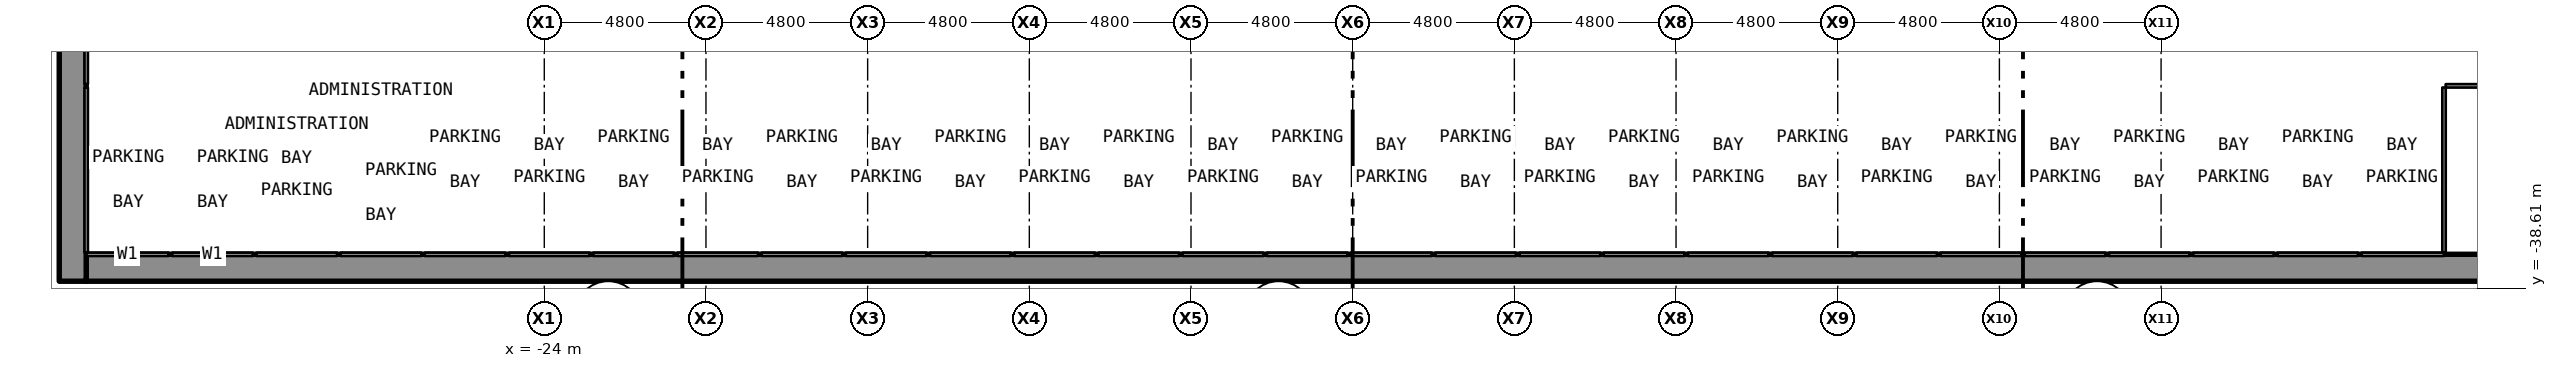
"""IFC4 building model, lengths in metres.
Left out: names, types, materials, properties, quantities, classifications, styles, units other than length and angle.
Written with IfcOpenShell. Run it as: python <this file> out.ifc"""

import sys

from ifc_helpers import new_model, si_unit, direction, frame, frame_2d, origin, place, context, subcontext, project, spatial, rectangle, extrude, element, save


model = new_model("IFC4")
c1 = context("Model", 3, precision=1e-05, world=origin(), true_north=direction((0.0, 1.0)))
c2 = subcontext(c1, "Body", "Model", "MODEL_VIEW")
j1 = project(units=[si_unit("LENGTHUNIT", "METRE"), si_unit("PLANEANGLEUNIT", "RADIAN")], contexts=[c1])
p1 = place(None, origin())
s1 = spatial("IfcSite", under=j1, at=p1, CompositionType="ELEMENT")
p2 = place(p1, origin())
s2 = spatial("IfcBuilding", under=s1, at=p2, CompositionType="ELEMENT")
p3 = place(p2, frame((0.0, 0.0, -5.0)))
s3 = spatial("IfcBuildingStorey", under=s2, at=p3, CompositionType="ELEMENT", Elevation=-5.0)
p4 = place(p3, frame((-37.6, -38.0, -0.3), z_axis=(0.0, 0.0, 1.0), x_axis=(1.0, 0.0, 0.0)))
e1 = element("IfcWall", 1, at=p4, inside=s3, PredefinedType="SOLIDWALL", context=c2, shape_type="SweptSolid", body=[
    extrude(rectangle(XDim=75.2, YDim=0.8, at=frame_2d((37.6, 0.0))), origin(), (0.0, 0.0, 1.0), 4.378),
])
p5 = place(p3, frame((-38.0, -38.4, -0.3), z_axis=(0.0, 0.0, 1.0), x_axis=(0.0, 1.0, 0.0)))
e2 = element("IfcWall", 2, at=p5, inside=s3, PredefinedType="SOLIDWALL", context=c2, shape_type="SweptSolid", body=[
    extrude(rectangle(XDim=67.2, YDim=0.8, at=frame_2d((33.6, 0.0))), origin(), (0.0, 0.0, 1.0), 4.378),
])
p6 = place(p5, frame((55.7, 0.0, 0.0)))
e3 = element("IfcOpeningElement", 3, at=p6, cuts=e2, PredefinedType="OPENING", context=c2, shape_type="SweptSolid", body=[
    extrude(rectangle(XDim=6.0, YDim=2.5, at=frame_2d((3.0, 1.25))), frame((0.0, 0.412, 0.0), z_axis=(0.0, -1.0, 0.0), x_axis=(1.0, 0.0, 0.0)), (0.0, 0.0, 1.0), 0.824),
])
p7 = place(p2, frame((0.0, 0.0, -10.0)))
s4 = spatial("IfcBuildingStorey", under=s2, at=p7, CompositionType="ELEMENT", Elevation=-10.0)
p8 = place(p7, frame((-53.8, -33.65, -0.3), z_axis=(0.0, 0.0, 1.0), x_axis=(1.0, 0.0, 0.0)))
e4 = element("IfcWall", 4, at=p8, inside=s4, PredefinedType="SOLIDWALL", context=c2, shape_type="SweptSolid", body=[
    extrude(rectangle(XDim=15.4, YDim=0.5, at=frame_2d((7.7, 0.0))), origin(), (0.0, 0.0, 1.0), 10.45),
])
p9 = place(p3, frame((-37.6, -37.6, 0.0), z_axis=(0.0, 0.0, 1.0), x_axis=(1.0, 0.0, 0.0)))
e5 = element("IfcWall", 5, at=p9, inside=s3, PredefinedType="PARTITIONING", context=c2, shape_type="SweptSolid", body=[
    extrude(rectangle(XDim=2.45, YDim=0.1, at=frame_2d((1.225, 0.0))), origin(), (0.0, 0.0, 1.0), 4.7),
])
for number, where, z_axis, x_axis in (
    (6, (-35.05, -37.6, 0.0), (0.0, 0.0, 1.0), (1.0, 0.0, 0.0)),
    (7, (-32.55, -37.6, 0.0), (0.0, 0.0, 1.0), (1.0, 0.0, 0.0)),
    (8, (-30.05, -37.6, 0.0), (0.0, 0.0, 1.0), (1.0, 0.0, 0.0)),
    (9, (-27.55, -37.6, 0.0), (0.0, 0.0, 1.0), (1.0, 0.0, 0.0)),
    (10, (-25.05, -37.6, 0.0), (0.0, 0.0, 1.0), (1.0, 0.0, 0.0)),
    (11, (-22.55, -37.6, 0.0), (0.0, 0.0, 1.0), (1.0, 0.0, 0.0)),
    (12, (-20.05, -37.6, 0.0), (0.0, 0.0, 1.0), (1.0, 0.0, 0.0)),
    (13, (-17.55, -37.6, 0.0), (0.0, 0.0, 1.0), (1.0, 0.0, 0.0)),
    (14, (-15.05, -37.6, 0.0), (0.0, 0.0, 1.0), (1.0, 0.0, 0.0)),
    (15, (-12.55, -37.6, 0.0), (0.0, 0.0, 1.0), (1.0, 0.0, 0.0)),
    (16, (-10.05, -37.6, 0.0), (0.0, 0.0, 1.0), (1.0, 0.0, 0.0)),
    (17, (-7.55, -37.6, 0.0), (0.0, 0.0, 1.0), (1.0, 0.0, 0.0)),
    (18, (-5.05, -37.6, 0.0), (0.0, 0.0, 1.0), (1.0, 0.0, 0.0)),
    (19, (-2.55, -37.6, 0.0), (0.0, 0.0, 1.0), (1.0, 0.0, 0.0)),
    (20, (-0.05, -37.6, 0.0), (0.0, 0.0, 1.0), (1.0, 0.0, 0.0)),
    (21, (2.45, -37.6, 0.0), (0.0, 0.0, 1.0), (1.0, 0.0, 0.0)),
    (22, (4.95, -37.6, 0.0), (0.0, 0.0, 1.0), (1.0, 0.0, 0.0)),
    (23, (7.45, -37.6, 0.0), (0.0, 0.0, 1.0), (1.0, 0.0, 0.0)),
    (24, (9.95, -37.6, 0.0), (0.0, 0.0, 1.0), (1.0, 0.0, 0.0)),
    (25, (12.45, -37.6, 0.0), (0.0, 0.0, 1.0), (1.0, 0.0, 0.0)),
    (26, (14.95, -37.6, 0.0), (0.0, 0.0, 1.0), (1.0, 0.0, 0.0)),
    (27, (17.45, -37.6, 0.0), (0.0, 0.0, 1.0), (1.0, 0.0, 0.0)),
    (28, (19.95, -37.6, 0.0), (0.0, 0.0, 1.0), (1.0, 0.0, 0.0)),
    (29, (22.45, -37.6, 0.0), (0.0, 0.0, 1.0), (1.0, 0.0, 0.0)),
    (30, (24.95, -37.6, 0.0), (0.0, 0.0, 1.0), (1.0, 0.0, 0.0)),
    (31, (27.45, -37.6, 0.0), (0.0, 0.0, 1.0), (1.0, 0.0, 0.0)),
):
    element("IfcWall", number, at=place(p3, frame(where, z_axis=z_axis, x_axis=x_axis)), inside=s3, PredefinedType="PARTITIONING", context=c2, shape_type="SweptSolid", body=[
        extrude(rectangle(XDim=2.4, YDim=0.1, at=frame_2d((1.2, 0.0))), origin(), (0.0, 0.0, 1.0), 4.7),
    ])
p10 = place(p3, frame((29.95, -37.6, 0.0), z_axis=(0.0, 0.0, 1.0), x_axis=(1.0, 0.0, 0.0)))
e32 = element("IfcWall", 32, at=p10, inside=s3, PredefinedType="PARTITIONING", context=c2, shape_type="SweptSolid", body=[
    extrude(rectangle(XDim=2.45, YDim=0.1, at=frame_2d((1.225, 0.0))), origin(), (0.0, 0.0, 1.0), 4.7),
])
p11 = place(p3, frame((32.45, -32.6, 0.0), z_axis=(0.0, 0.0, 1.0), x_axis=(1.0, 0.0, 0.0)))
e33 = element("IfcWall", 33, at=p11, inside=s3, PredefinedType="PARTITIONING", context=c2, shape_type="SweptSolid", body=[
    extrude(rectangle(XDim=5.15, YDim=0.1, at=frame_2d((2.575, 0.0))), origin(), (0.0, 0.0, 1.0), 4.7),
])
p12 = place(p3, frame((-37.6, -37.55, 0.0), z_axis=(0.0, 0.0, 1.0), x_axis=(0.0, 1.0, 0.0)))
e34 = element("IfcWall", 34, at=p12, inside=s3, PredefinedType="PARTITIONING", context=c2, shape_type="SweptSolid", body=[
    extrude(rectangle(XDim=4.9, YDim=0.1, at=frame_2d((2.45, 0.0))), origin(), (0.0, 0.0, 1.0), 4.7),
])
p13 = place(p3, frame((-37.6, -32.55, 0.0), z_axis=(0.0, 0.0, 1.0), x_axis=(0.0, 1.0, 0.0)))
e35 = element("IfcWall", 35, at=p13, inside=s3, PredefinedType="PARTITIONING", context=c2, shape_type="SweptSolid", body=[
    extrude(rectangle(XDim=5.9, YDim=0.1, at=frame_2d((2.95, 0.0))), origin(), (0.0, 0.0, 1.0), 4.7),
])
p14 = place(p3, frame((32.4, -37.55, 0.0), z_axis=(0.0, 0.0, 1.0), x_axis=(0.0, 1.0, 0.0)))
e36 = element("IfcWall", 36, at=p14, inside=s3, PredefinedType="PARTITIONING", context=c2, shape_type="SweptSolid", body=[
    extrude(rectangle(XDim=4.9, YDim=0.1, at=frame_2d((2.45, 0.0))), origin(), (0.0, 0.0, 1.0), 4.7),
])
save(model, sys.argv[1])
